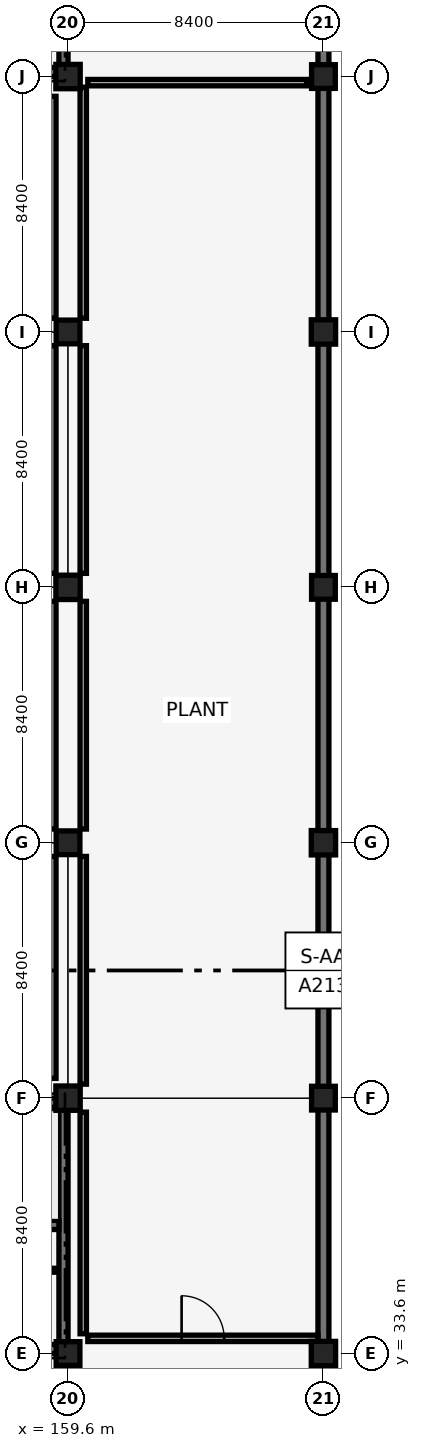
"""IFC4 building model, lengths in metres.
Left out: names, types, materials, properties, quantities, classifications, styles, units other than length and angle.
Written with IfcOpenShell. Run it as: python <this file> out.ifc"""

import sys

from ifc_helpers import new_model, si_unit, direction, frame, frame_2d, origin, origin_2d, place, context, subcontext, project, spatial, rectangle, extrude, element, fill, save


model = new_model("IFC4")
c1 = context("Model", 3, precision=1e-05, world=origin(), true_north=direction((0.0, 1.0)))
c2 = subcontext(c1, "Body", "Model", "MODEL_VIEW")
j1 = project(units=[si_unit("LENGTHUNIT", "METRE"), si_unit("PLANEANGLEUNIT", "RADIAN")], contexts=[c1])
p1 = place(None, origin())
s1 = spatial("IfcSite", under=j1, at=p1, CompositionType="ELEMENT")
p2 = place(p1, origin())
s2 = spatial("IfcBuilding", under=s1, at=p2, CompositionType="ELEMENT")
p3 = place(p2, frame((0.0, 0.0, -4.42)))
s3 = spatial("IfcBuildingStorey", under=s2, at=p3, CompositionType="ELEMENT", Elevation=-4.42)
for number, where, z_axis, x_axis in (
    (1, (168.0, 25.55, 0.0), (0.0, 0.0, 1.0), (0.0, 1.0, 0.0)),
    (2, (168.0, 33.95, 0.0), (0.0, 0.0, 1.0), (0.0, 1.0, 0.0)),
    (3, (168.0, 42.35, 0.0), (0.0, 0.0, 1.0), (0.0, 1.0, 0.0)),
    (4, (168.0, 50.75, 0.0), (0.0, 0.0, 1.0), (0.0, 1.0, 0.0)),
):
    element("IfcWall", number, at=place(p3, frame(where, z_axis=z_axis, x_axis=x_axis)), inside=s3, PredefinedType="USERDEFINED", context=c2, shape_type="SweptSolid", body=[
        extrude(rectangle(XDim=7.7, YDim=0.36, at=frame_2d((3.85, 0.0))), origin(), (0.0, 0.0, 1.0), 4.12),
    ])
p4 = place(p3, frame((168.0, 59.15, 0.0), z_axis=(0.0, 0.0, 1.0), x_axis=(0.0, 1.0, 0.0)))
e5 = element("IfcWall", 5, at=p4, inside=s3, PredefinedType="USERDEFINED", context=c2, shape_type="SweptSolid", body=[
    extrude(rectangle(XDim=7.7, YDim=0.36, at=frame_2d((3.85, 0.0))), origin(), (0.0, 0.0, 1.0), 4.12),
])
for number, where, z_axis, x_axis in (
    (6, (168.0, 67.55, 0.0), (0.0, 0.0, 1.0), (0.0, 1.0, 0.0)),
    (7, (168.0, 75.95, 0.0), (0.0, 0.0, 1.0), (0.0, 1.0, 0.0)),
):
    element("IfcWall", number, at=place(p3, frame(where, z_axis=z_axis, x_axis=x_axis)), inside=s3, PredefinedType="USERDEFINED", context=c2, shape_type="SweptSolid", body=[
        extrude(rectangle(XDim=7.7, YDim=0.36, at=frame_2d((3.85, 0.0))), origin(), (0.0, 0.0, 1.0), 4.12),
    ])
p5 = place(p3, frame((151.35, 33.75, 0.0), z_axis=(0.0, 0.0, 1.0), x_axis=(1.0, 0.0, 0.0)))
e8 = element("IfcWall", 8, at=p5, inside=s3, PredefinedType="SHEAR", context=c2, shape_type="SweptSolid", body=[
    extrude(rectangle(XDim=8.1, YDim=0.3, at=frame_2d((4.05, 0.0))), origin(), (0.0, 0.0, 1.0), 4.12),
])
p6 = place(p5, frame((6.615, 0.0, 0.0)))
e9 = element("IfcOpeningElement", 9, at=p6, cuts=e8, PredefinedType="OPENING", context=c2, shape_type="SweptSolid", body=[
    extrude(rectangle(XDim=1.0, YDim=2.15, at=frame_2d((0.5, 1.075))), frame((0.0, 0.16, 0.0), z_axis=(0.0, -1.0, 0.0), x_axis=(1.0, 0.0, 0.0)), (0.0, 0.0, 1.0), 0.32),
])
p7 = place(p3, frame((151.35, 41.85, 0.0), z_axis=(0.0, 0.0, 1.0), x_axis=(1.0, 0.0, 0.0)))
e10 = element("IfcWall", 10, at=p7, inside=s3, PredefinedType="SHEAR", context=c2, shape_type="SweptSolid", body=[
    extrude(rectangle(XDim=8.1, YDim=0.3, at=frame_2d((4.05, 0.0))), origin(), (0.0, 0.0, 1.0), 4.12),
])
p8 = place(p3, frame((159.45, 33.75, 0.0), z_axis=(0.0, 0.0, 1.0), x_axis=(0.0, 1.0, 0.0)))
e11 = element("IfcWall", 11, at=p8, inside=s3, PredefinedType="SHEAR", context=c2, shape_type="SweptSolid", body=[
    extrude(rectangle(XDim=8.1, YDim=0.3, at=frame_2d((4.05, 0.0))), origin(), (0.0, 0.0, 1.0), 4.12),
])
p9 = place(p3, frame((151.5, 37.83, 0.0), z_axis=(0.0, 0.0, 1.0), x_axis=(1.0, 0.0, 0.0)))
e12 = element("IfcWall", 12, at=p9, inside=s3, PredefinedType="SHEAR", context=c2, shape_type="SweptSolid", body=[
    extrude(rectangle(XDim=7.8, YDim=0.3, at=frame_2d((3.9, 0.0))), origin(), (0.0, 0.0, 1.0), 4.12),
])
p10 = place(p9, frame((0.25, 0.0, 0.0)))
e13 = element("IfcOpeningElement", 13, at=p10, cuts=e12, PredefinedType="OPENING", context=c2, shape_type="SweptSolid", body=[
    extrude(rectangle(XDim=1.35, YDim=2.15, at=frame_2d((0.675, 1.075))), frame((0.0, 0.16, 0.0), z_axis=(0.0, -1.0, 0.0), x_axis=(1.0, 0.0, 0.0)), (0.0, 0.0, 1.0), 0.32),
])
p11 = place(p3, frame((151.35, 75.75, 0.0), z_axis=(0.0, 0.0, 1.0), x_axis=(1.0, 0.0, 0.0)))
e14 = element("IfcWall", 14, at=p11, inside=s3, PredefinedType="SHEAR", context=c2, shape_type="SweptSolid", body=[
    extrude(rectangle(XDim=8.1, YDim=0.3, at=frame_2d((4.05, 0.0))), origin(), (0.0, 0.0, 1.0), 4.12),
])
p12 = place(p11, frame((6.615, 0.0, 0.0)))
e15 = element("IfcOpeningElement", 15, at=p12, cuts=e14, PredefinedType="OPENING", context=c2, shape_type="SweptSolid", body=[
    extrude(rectangle(XDim=1.0, YDim=2.15, at=frame_2d((0.5, 1.075))), frame((0.0, 0.16, 0.0), z_axis=(0.0, -1.0, 0.0), x_axis=(1.0, 0.0, 0.0)), (0.0, 0.0, 1.0), 0.32),
])
p13 = place(p3, frame((159.45, 75.75, 0.0), z_axis=(0.0, 0.0, 1.0), x_axis=(0.0, 1.0, 0.0)))
e16 = element("IfcWall", 16, at=p13, inside=s3, PredefinedType="SHEAR", context=c2, shape_type="SweptSolid", body=[
    extrude(rectangle(XDim=8.1, YDim=0.3, at=frame_2d((4.05, 0.0))), origin(), (0.0, 0.0, 1.0), 4.12),
])
p14 = place(p3, frame((159.6, 33.6, -0.4), z_axis=(0.0, 0.0, 1.0), x_axis=(1.0, 0.0, 0.0)))
e17 = element("IfcColumn", 17, at=p14, inside=s3, PredefinedType="COLUMN", context=c2, shape_type="SweptSolid", body=[
    extrude(rectangle(XDim=0.78, YDim=0.78, at=origin_2d()), origin(), (0.0, 0.0, 1.0), 4.52),
])
p15 = place(p3, frame((159.6, 42.0, -0.4), z_axis=(0.0, 0.0, 1.0), x_axis=(1.0, 0.0, 0.0)))
e18 = element("IfcColumn", 18, at=p15, inside=s3, PredefinedType="COLUMN", context=c2, shape_type="SweptSolid", body=[
    extrude(rectangle(XDim=0.8, YDim=0.8, at=origin_2d()), origin(), (0.0, 0.0, 1.0), 4.52),
])
p16 = place(p3, frame((159.6, 50.4, -0.4), z_axis=(0.0, 0.0, 1.0), x_axis=(1.0, 0.0, 0.0)))
e19 = element("IfcColumn", 19, at=p16, inside=s3, PredefinedType="COLUMN", context=c2, shape_type="SweptSolid", body=[
    extrude(rectangle(XDim=0.78, YDim=0.78, at=origin_2d()), origin(), (0.0, 0.0, 1.0), 4.52),
])
p17 = place(p3, frame((159.6, 58.8, -0.4), z_axis=(0.0, 0.0, 1.0), x_axis=(1.0, 0.0, 0.0)))
e20 = element("IfcColumn", 20, at=p17, inside=s3, PredefinedType="COLUMN", context=c2, shape_type="SweptSolid", body=[
    extrude(rectangle(XDim=0.8, YDim=0.8, at=origin_2d()), origin(), (0.0, 0.0, 1.0), 4.52),
])
p18 = place(p3, frame((159.6, 67.2, -0.4), z_axis=(0.0, 0.0, 1.0), x_axis=(1.0, 0.0, 0.0)))
e21 = element("IfcColumn", 21, at=p18, inside=s3, PredefinedType="COLUMN", context=c2, shape_type="SweptSolid", body=[
    extrude(rectangle(XDim=0.78, YDim=0.78, at=origin_2d()), origin(), (0.0, 0.0, 1.0), 4.52),
])
for number, where, z_axis, x_axis in (
    (22, (159.6, 75.6, -0.4), (0.0, 0.0, 1.0), (1.0, 0.0, 0.0)),
    (23, (168.0, 33.6, -0.4), (0.0, 0.0, 1.0), (1.0, 0.0, 0.0)),
):
    element("IfcColumn", number, at=place(p3, frame(where, z_axis=z_axis, x_axis=x_axis)), inside=s3, PredefinedType="COLUMN", context=c2, shape_type="SweptSolid", body=[
        extrude(rectangle(XDim=0.8, YDim=0.8, at=origin_2d()), origin(), (0.0, 0.0, 1.0), 4.52),
    ])
p19 = place(p3, frame((168.0, 42.0, -0.4), z_axis=(0.0, 0.0, 1.0), x_axis=(1.0, 0.0, 0.0)))
e24 = element("IfcColumn", 24, at=p19, inside=s3, PredefinedType="COLUMN", context=c2, shape_type="SweptSolid", body=[
    extrude(rectangle(XDim=0.78, YDim=0.78, at=origin_2d()), origin(), (0.0, 0.0, 1.0), 4.52),
])
p20 = place(p3, frame((168.0, 50.4, -0.4), z_axis=(0.0, 0.0, 1.0), x_axis=(1.0, 0.0, 0.0)))
e25 = element("IfcColumn", 25, at=p20, inside=s3, PredefinedType="COLUMN", context=c2, shape_type="SweptSolid", body=[
    extrude(rectangle(XDim=0.8, YDim=0.8, at=origin_2d()), origin(), (0.0, 0.0, 1.0), 4.52),
])
p21 = place(p3, frame((168.0, 58.8, -0.4), z_axis=(0.0, 0.0, 1.0), x_axis=(1.0, 0.0, 0.0)))
e26 = element("IfcColumn", 26, at=p21, inside=s3, PredefinedType="COLUMN", context=c2, shape_type="SweptSolid", body=[
    extrude(rectangle(XDim=0.78, YDim=0.78, at=origin_2d()), origin(), (0.0, 0.0, 1.0), 4.52),
])
p22 = place(p3, frame((168.0, 67.2, -0.4), z_axis=(0.0, 0.0, 1.0), x_axis=(1.0, 0.0, 0.0)))
e27 = element("IfcColumn", 27, at=p22, inside=s3, PredefinedType="COLUMN", context=c2, shape_type="SweptSolid", body=[
    extrude(rectangle(XDim=0.8, YDim=0.8, at=origin_2d()), origin(), (0.0, 0.0, 1.0), 4.52),
])
p23 = place(p3, frame((168.0, 75.6, -0.4), z_axis=(0.0, 0.0, 1.0), x_axis=(1.0, 0.0, 0.0)))
e28 = element("IfcColumn", 28, at=p23, inside=s3, PredefinedType="COLUMN", context=c2, shape_type="SweptSolid", body=[
    extrude(rectangle(XDim=0.78, YDim=0.78, at=origin_2d()), origin(), (0.0, 0.0, 1.0), 4.52),
])
p24 = place(p3, frame((157.66, 36.34, 0.0), z_axis=(0.0, 0.0, 1.0), x_axis=(1.0, 0.0, 0.0)))
e29 = element("IfcWall", 29, at=p24, inside=s3, PredefinedType="PARTITIONING", context=c2, shape_type="SweptSolid", body=[
    extrude(rectangle(XDim=1.62, YDim=0.13, at=frame_2d((0.81, 0.0))), origin(), (0.0, 0.0, 1.0), 4.12),
])
p25 = place(p3, frame((160.25, 34.1, 0.0), z_axis=(0.0, 0.0, 1.0), x_axis=(1.0, 0.0, 0.0)))
e30 = element("IfcWall", 30, at=p25, inside=s3, PredefinedType="PARTITIONING", context=c2, shape_type="SweptSolid", body=[
    extrude(rectangle(XDim=7.57, YDim=0.21, at=frame_2d((3.785, 0.0))), origin(), (0.0, 0.0, 1.0), 3.37),
])
p26 = place(p25, frame((3.085, 0.0, 0.0)))
e31 = element("IfcOpeningElement", 31, at=p26, cuts=e30, PredefinedType="OPENING", context=c2, shape_type="SweptSolid", body=[
    extrude(rectangle(XDim=1.4, YDim=2.2, at=frame_2d((0.7, 1.1))), frame((0.0, 0.115, 0.0), z_axis=(0.0, -1.0, 0.0), x_axis=(1.0, 0.0, 0.0)), (0.0, 0.0, 1.0), 0.23),
])
p27 = place(p3, frame((160.25, 75.4, 0.0), z_axis=(0.0, 0.0, 1.0), x_axis=(1.0, 0.0, 0.0)))
e32 = element("IfcWall", 32, at=p27, inside=s3, PredefinedType="PARTITIONING", context=c2, shape_type="SweptSolid", body=[
    extrude(rectangle(XDim=7.2, YDim=0.21, at=frame_2d((3.6, 0.0))), origin(), (0.0, 0.0, 1.0), 3.17),
])
p28 = place(p3, frame((160.1, 34.25, 0.0), z_axis=(0.0, 0.0, 1.0), x_axis=(0.0, 1.0, 0.0)))
e33 = element("IfcWall", 33, at=p28, inside=s3, PredefinedType="PARTITIONING", context=c2, shape_type="SweptSolid", body=[
    extrude(rectangle(XDim=7.29, YDim=0.21, at=frame_2d((3.645, 0.0))), origin(), (0.0, 0.0, 1.0), 3.56),
])
p29 = place(p3, frame((160.1, 42.46, 0.0), z_axis=(0.0, 0.0, 1.0), x_axis=(0.0, 1.0, 0.0)))
e34 = element("IfcWall", 34, at=p29, inside=s3, PredefinedType="PARTITIONING", context=c2, shape_type="SweptSolid", body=[
    extrude(rectangle(XDim=7.49, YDim=0.21, at=frame_2d((3.745, 0.0))), origin(), (0.0, 0.0, 1.0), 3.57),
])
p30 = place(p3, frame((160.1, 50.85, 0.0), z_axis=(0.0, 0.0, 1.0), x_axis=(0.0, 1.0, 0.0)))
e35 = element("IfcWall", 35, at=p30, inside=s3, PredefinedType="PARTITIONING", context=c2, shape_type="SweptSolid", body=[
    extrude(rectangle(XDim=7.49, YDim=0.21, at=frame_2d((3.745, 0.0))), origin(), (0.0, 0.0, 1.0), 3.56),
])
p31 = place(p3, frame((160.1, 59.26, 0.0), z_axis=(0.0, 0.0, 1.0), x_axis=(0.0, 1.0, 0.0)))
e36 = element("IfcWall", 36, at=p31, inside=s3, PredefinedType="PARTITIONING", context=c2, shape_type="SweptSolid", body=[
    extrude(rectangle(XDim=7.49, YDim=0.21, at=frame_2d((3.745, 0.0))), origin(), (0.0, 0.0, 1.0), 3.57),
])
p32 = place(p3, frame((160.1, 67.65, 0.0), z_axis=(0.0, 0.0, 1.0), x_axis=(0.0, 1.0, 0.0)))
e37 = element("IfcWall", 37, at=p32, inside=s3, PredefinedType="PARTITIONING", context=c2, shape_type="SweptSolid", body=[
    extrude(rectangle(XDim=7.6, YDim=0.21, at=frame_2d((3.8, 0.0))), origin(), (0.0, 0.0, 1.0), 3.17),
])
p33 = place(p3, frame((159.1, 42.65, 0.0), z_axis=(0.0, 0.0, 1.0), x_axis=(0.0, 1.0, 0.0)))
e38 = element("IfcWall", 38, at=p33, inside=s3, PredefinedType="PARTITIONING", context=c2, shape_type="SweptSolid", body=[
    extrude(rectangle(XDim=7.3, YDim=0.21, at=frame_2d((3.65, 0.0))), origin(), (0.0, 0.0, 1.0), 3.56),
])
p34 = place(p3, frame((159.1, 50.85, 0.0), z_axis=(0.0, 0.0, 1.0), x_axis=(0.0, 1.0, 0.0)))
e39 = element("IfcWall", 39, at=p34, inside=s3, PredefinedType="PARTITIONING", context=c2, shape_type="SweptSolid", body=[
    extrude(rectangle(XDim=7.49, YDim=0.21, at=frame_2d((3.745, 0.0))), origin(), (0.0, 0.0, 1.0), 3.57),
])
p35 = place(p3, frame((159.1, 59.26, 0.0), z_axis=(0.0, 0.0, 1.0), x_axis=(0.0, 1.0, 0.0)))
e40 = element("IfcWall", 40, at=p35, inside=s3, PredefinedType="PARTITIONING", context=c2, shape_type="SweptSolid", body=[
    extrude(rectangle(XDim=7.49, YDim=0.21, at=frame_2d((3.745, 0.0))), origin(), (0.0, 0.0, 1.0), 3.56),
])
p36 = place(p3, frame((159.1, 67.65, 0.0), z_axis=(0.0, 0.0, 1.0), x_axis=(0.0, 1.0, 0.0)))
e41 = element("IfcWall", 41, at=p36, inside=s3, PredefinedType="PARTITIONING", context=c2, shape_type="SweptSolid", body=[
    extrude(rectangle(XDim=7.3, YDim=0.21, at=frame_2d((3.65, 0.0))), origin(), (0.0, 0.0, 1.0), 3.57),
])
p37 = place(p26, origin())
e42 = element("IfcDoor", 42, at=p37, inside=s3, OperationType="DOUBLE_DOOR_SINGLE_SWING", PredefinedType="DOOR", context=c2, shape_type="SweptSolid", body=[
    extrude(rectangle(XDim=1.4, YDim=2.2, at=frame_2d((0.7, 1.1))), frame((0.0, 0.025, 0.0), z_axis=(0.0, -1.0, 0.0), x_axis=(1.0, 0.0, 0.0)), (0.0, 0.0, 1.0), 0.05),
])
fill(e31, e42)
save(model, sys.argv[1])
